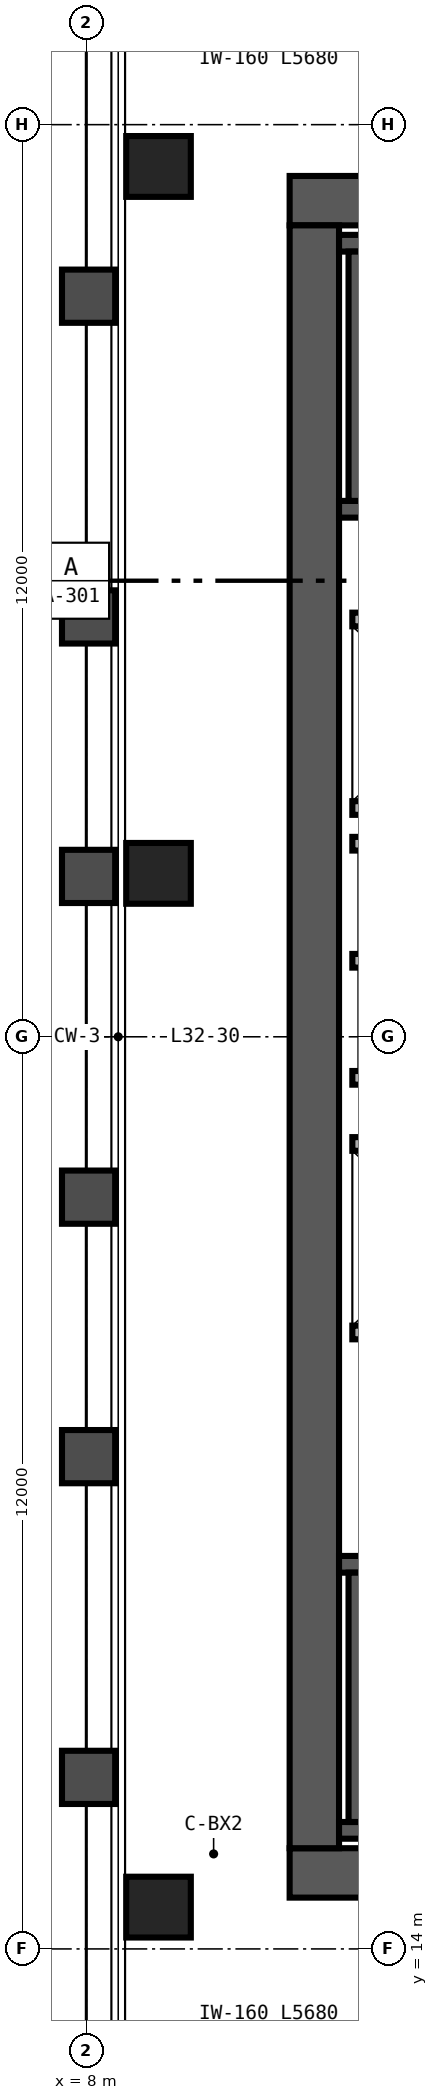
"""IFC4 building model, lengths in metres.
Left out: names, types, materials, properties, quantities, classifications, styles, units other than length and angle.
Written with IfcOpenShell. Run it as: python <this file> out.ifc"""

import sys

from ifc_helpers import new_model, si_unit, direction, frame, frame_2d, origin, origin_2d, place, context, subcontext, project, spatial, rectangle, hollow_rectangle, extrude, source, transform, mapped, element, save


model = new_model("IFC4")
c1 = context("Model", 3, precision=1e-05, world=origin(), true_north=direction((0.0, 1.0)))
c2 = subcontext(c1, "Body", "Model", "MODEL_VIEW")
j1 = project(units=[si_unit("LENGTHUNIT", "METRE"), si_unit("PLANEANGLEUNIT", "RADIAN")], contexts=[c1])
p1 = place(None, origin())
s1 = spatial("IfcSite", under=j1, at=p1, CompositionType="ELEMENT")
p2 = place(p1, origin())
s2 = spatial("IfcBuilding", under=s1, at=p2, CompositionType="ELEMENT")
p3 = place(p2, frame((0.0, 0.0, 129.6)))
s3 = spatial("IfcBuildingStorey", under=s2, at=p3, CompositionType="ELEMENT", Elevation=129.6)
p4 = place(p3, frame((10.675, 15.0, 0.0), z_axis=(0.0, 0.0, 1.0), x_axis=(1.0, 0.0, 0.0)))
e1 = element("IfcWall", 1, at=p4, inside=s3, PredefinedType="SHEAR", context=c2, shape_type="SweptSolid", body=[
    extrude(rectangle(XDim=12.65, YDim=0.65, at=frame_2d((6.325, 0.0))), origin(), (0.0, 0.0, 1.0), 3.36),
])
p5 = place(p4, frame((10.225, 0.0, 0.0)))
e2 = element("IfcOpeningElement", 2, at=p5, cuts=e1, PredefinedType="OPENING", context=c2, shape_type="SweptSolid", body=[
    extrude(rectangle(XDim=1.0, YDim=2.15, at=frame_2d((0.5, 1.075))), frame((0.0, 0.335, 0.0), z_axis=(0.0, -1.0, 0.0), x_axis=(1.0, 0.0, 0.0)), (0.0, 0.0, 1.0), 0.67),
])
p6 = place(p3, frame((10.675, 37.0, 0.0), z_axis=(0.0, 0.0, 1.0), x_axis=(1.0, 0.0, 0.0)))
e3 = element("IfcWall", 3, at=p6, inside=s3, PredefinedType="SHEAR", context=c2, shape_type="SweptSolid", body=[
    extrude(rectangle(XDim=12.65, YDim=0.65, at=frame_2d((6.325, 0.0))), origin(), (0.0, 0.0, 1.0), 3.36),
])
p7 = place(p6, frame((8.905, 0.0, 0.0)))
e4 = element("IfcOpeningElement", 4, at=p7, cuts=e3, PredefinedType="OPENING", context=c2, shape_type="SweptSolid", body=[
    extrude(rectangle(XDim=1.0, YDim=2.15, at=frame_2d((0.5, 1.075))), frame((0.0, 0.335, 0.0), z_axis=(0.0, -1.0, 0.0), x_axis=(1.0, 0.0, 0.0)), (0.0, 0.0, 1.0), 0.67),
])
p8 = place(p3, frame((11.0, 15.325, 0.0), z_axis=(0.0, 0.0, 1.0), x_axis=(0.0, 1.0, 0.0)))
e5 = element("IfcWall", 5, at=p8, inside=s3, PredefinedType="SHEAR", context=c2, shape_type="SweptSolid", body=[
    extrude(rectangle(XDim=21.35, YDim=0.65, at=frame_2d((10.675, 0.0))), origin(), (0.0, 0.0, 1.0), 3.36),
])
p9 = place(p3, frame((11.325, 15.56, 0.0), z_axis=(0.0, 0.0, 1.0), x_axis=(1.0, 0.0, 0.0)))
e6 = element("IfcWall", 6, at=p9, inside=s3, PredefinedType="SHEAR", context=c2, shape_type="SweptSolid", body=[
    extrude(rectangle(XDim=7.985, YDim=0.22, at=frame_2d((3.993, 0.0))), origin(), (0.0, 0.0, 1.0), 3.4),
])
p10 = place(p3, frame((11.325, 19.06, 0.0), z_axis=(0.0, 0.0, 1.0), x_axis=(1.0, 0.0, 0.0)))
e7 = element("IfcWall", 7, at=p10, inside=s3, PredefinedType="SHEAR", context=c2, shape_type="SweptSolid", body=[
    extrude(rectangle(XDim=7.985, YDim=0.22, at=frame_2d((3.993, 0.0))), origin(), (0.0, 0.0, 1.0), 3.4),
])
p11 = place(p10, frame((0.595, 0.0, 0.0)))
e8 = element("IfcOpeningElement", 8, at=p11, cuts=e7, PredefinedType="OPENING", context=c2, shape_type="SweptSolid", body=[
    extrude(rectangle(XDim=1.05, YDim=2.15, at=frame_2d((0.525, 1.075))), frame((0.0, 0.12, 0.0), z_axis=(0.0, -1.0, 0.0), x_axis=(1.0, 0.0, 0.0)), (0.0, 0.0, 1.0), 0.24),
])
p12 = place(p3, frame((11.56, 15.67, 0.0), z_axis=(0.0, 0.0, 1.0), x_axis=(0.0, 1.0, 0.0)))
e9 = element("IfcWall", 9, at=p12, inside=s3, PredefinedType="SHEAR", context=c2, shape_type="SweptSolid", body=[
    extrude(rectangle(XDim=3.28, YDim=0.22, at=frame_2d((1.64, 0.0))), origin(), (0.0, 0.0, 1.0), 3.4),
])
p13 = place(p3, frame((11.325, 32.94, 0.0), z_axis=(0.0, 0.0, 1.0), x_axis=(1.0, 0.0, 0.0)))
e10 = element("IfcWall", 10, at=p13, inside=s3, PredefinedType="SHEAR", context=c2, shape_type="SweptSolid", body=[
    extrude(rectangle(XDim=7.985, YDim=0.22, at=frame_2d((3.993, 0.0))), origin(), (0.0, 0.0, 1.0), 3.4),
])
p14 = place(p13, frame((0.595, 0.0, 0.0)))
e11 = element("IfcOpeningElement", 11, at=p14, cuts=e10, PredefinedType="OPENING", context=c2, shape_type="SweptSolid", body=[
    extrude(rectangle(XDim=1.05, YDim=2.15, at=frame_2d((0.525, 1.075))), frame((0.0, 0.12, 0.0), z_axis=(0.0, -1.0, 0.0), x_axis=(1.0, 0.0, 0.0)), (0.0, 0.0, 1.0), 0.24),
])
p15 = place(p3, frame((11.325, 36.44, 0.0), z_axis=(0.0, 0.0, 1.0), x_axis=(1.0, 0.0, 0.0)))
e12 = element("IfcWall", 12, at=p15, inside=s3, PredefinedType="SHEAR", context=c2, shape_type="SweptSolid", body=[
    extrude(rectangle(XDim=7.985, YDim=0.22, at=frame_2d((3.993, 0.0))), origin(), (0.0, 0.0, 1.0), 3.4),
])
p16 = place(p3, frame((11.56, 33.05, 0.0), z_axis=(0.0, 0.0, 1.0), x_axis=(0.0, 1.0, 0.0)))
e13 = element("IfcWall", 13, at=p16, inside=s3, PredefinedType="SHEAR", context=c2, shape_type="SweptSolid", body=[
    extrude(rectangle(XDim=3.28, YDim=0.22, at=frame_2d((1.64, 0.0))), origin(), (0.0, 0.0, 1.0), 3.4),
])
m1 = source(origin(), c2, "Body", "SweptSolid", [
    extrude(hollow_rectangle(XDim=0.85, YDim=0.8, WallThickness=0.032, at=origin_2d()), origin(), (0.0, 0.0, 1.0), 3.36),
])
for number, where, z_axis, x_axis in (
    (14, (8.95, 14.55, 0.0), (0.0, 0.0, 1.0), (1.0, 0.0, 0.0)),
    (15, (8.95, 28.15, 0.0), (0.0, 0.0, 1.0), (1.0, 0.0, 0.0)),
    (16, (8.95, 37.45, 0.0), (0.0, 0.0, 1.0), (1.0, 0.0, 0.0)),
):
    element("IfcColumn", number, at=place(p3, frame(where, z_axis=z_axis, x_axis=x_axis)), inside=s3, PredefinedType="COLUMN", context=c2, shape_type="MappedRepresentation", body=[
        mapped(m1, transform((0.0, 0.0, 0.0), scale=1.0)),
    ])
for number, where, z_axis, x_axis in (
    (17, (11.5, 22.11, 0.0), (0.0, 0.0, 1.0), (1.0, 0.0, 0.0)),
    (18, (11.5, 24.59, 0.0), (0.0, 0.0, 1.0), (1.0, 0.0, 0.0)),
    (19, (11.5, 29.01, 0.0), (0.0, 0.0, 1.0), (1.0, 0.0, 0.0)),
    (20, (11.5, 31.49, 0.0), (0.0, 0.0, 1.0), (1.0, 0.0, 0.0)),
):
    element("IfcWall", number, at=place(p3, frame(where, z_axis=z_axis, x_axis=x_axis)), inside=s3, PredefinedType="SOLIDWALL", context=c2, shape_type="SweptSolid", body=[
        extrude(rectangle(XDim=2.5, YDim=0.18, at=frame_2d((1.25, 0.0))), origin(), (0.0, 0.0, 1.0), 3.36),
    ])
for number, where, z_axis, x_axis in (
    (21, (11.5, 25.46, 0.0), (0.0, 0.0, 1.0), (1.0, 0.0, 0.0)),
    (22, (11.5, 27.0, 0.0), (0.0, 0.0, 1.0), (1.0, 0.0, 0.0)),
    (23, (11.5, 28.54, 0.0), (0.0, 0.0, 1.0), (1.0, 0.0, 0.0)),
):
    element("IfcWall", number, at=place(p3, frame(where, z_axis=z_axis, x_axis=x_axis)), inside=s3, PredefinedType="SOLIDWALL", context=c2, shape_type="SweptSolid", body=[
        extrude(rectangle(XDim=2.51, YDim=0.18, at=frame_2d((1.255, 0.0))), origin(), (0.0, 0.0, 1.0), 3.36),
    ])
save(model, sys.argv[1])
